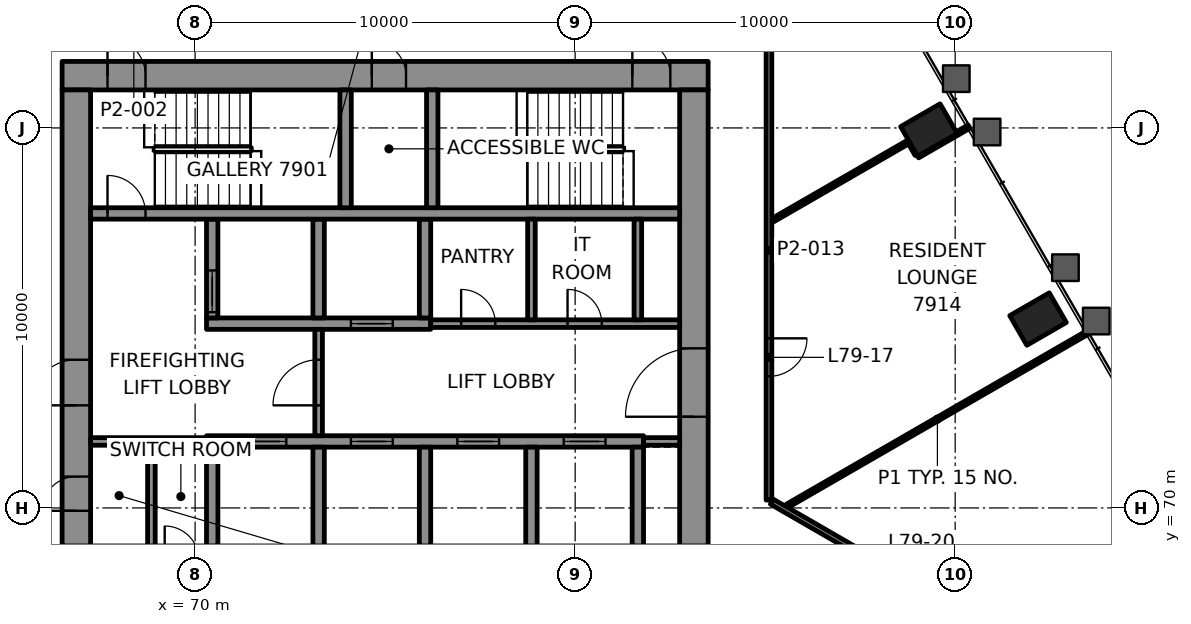
"""IFC4 building model, lengths in metres.
Left out: names, types, materials, properties, quantities, classifications, styles, units other than length and angle.
Written with IfcOpenShell. Run it as: python <this file> out.ifc"""

import sys

from ifc_helpers import new_model, si_unit, direction, frame, frame_2d, origin, origin_2d, place, context, subcontext, project, spatial, rectangle, hollow_rectangle, extrude, element, fill, save


model = new_model("IFC4")
c1 = context("Model", 3, precision=1e-05, world=origin(), true_north=direction((0.0, 1.0)))
c2 = subcontext(c1, "Body", "Model", "MODEL_VIEW")
j1 = project(units=[si_unit("LENGTHUNIT", "METRE"), si_unit("PLANEANGLEUNIT", "RADIAN")], contexts=[c1])
p1 = place(None, origin())
s1 = spatial("IfcSite", under=j1, at=p1, CompositionType="ELEMENT")
p2 = place(p1, origin())
s2 = spatial("IfcBuilding", under=s1, at=p2, CompositionType="ELEMENT")
p3 = place(p2, frame((0.0, 0.0, 323.1)))
s3 = spatial("IfcBuildingStorey", under=s2, at=p3, CompositionType="ELEMENT", Elevation=323.1)
for number, where, z_axis, x_axis in (
    (1, (92.181, 74.97, -0.0), (0.0, 0.0, 1.0), (-0.5, 0.866, 0.0)),
    (2, (89.309, 79.945, -0.0), (0.0, 0.0, 1.0), (-0.5, 0.866, 0.0)),
):
    element("IfcColumn", number, at=place(p3, frame(where, z_axis=z_axis, x_axis=x_axis)), inside=s3, PredefinedType="COLUMN", context=c2, shape_type="SweptSolid", body=[
        extrude(hollow_rectangle(XDim=0.9, YDim=1.2, WallThickness=0.06, at=origin_2d()), origin(), (0.0, 0.0, 1.0), 3.5),
    ])
p4 = place(p3, frame((66.5, 81.375, 0.0), z_axis=(0.0, 0.0, 1.0), x_axis=(1.0, 0.0, 0.0)))
e3 = element("IfcWall", 3, at=p4, inside=s3, PredefinedType="SHEAR", context=c2, shape_type="SweptSolid", body=[
    extrude(rectangle(XDim=17.0, YDim=0.75, at=frame_2d((8.5, 0.0))), origin(), (0.0, 0.0, 1.0), 3.2),
])
p5 = place(p4, frame((1.195, 0.0, 0.0)))
e4 = element("IfcOpeningElement", 4, at=p5, cuts=e3, PredefinedType="OPENING", context=c2, shape_type="SweptSolid", body=[
    extrude(rectangle(XDim=1.0, YDim=2.1, at=frame_2d((0.5, 1.05))), frame((0.0, 0.385, 0.0), z_axis=(0.0, -1.0, 0.0), x_axis=(1.0, 0.0, 0.0)), (0.0, 0.0, 1.0), 0.77),
])
p6 = place(p4, frame((15.005, 0.0, 0.0)))
e5 = element("IfcOpeningElement", 5, at=p6, cuts=e3, PredefinedType="OPENING", context=c2, shape_type="SweptSolid", body=[
    extrude(rectangle(XDim=1.0, YDim=2.1, at=frame_2d((0.5, 1.05))), frame((0.0, 0.385, 0.0), z_axis=(0.0, -1.0, 0.0), x_axis=(1.0, 0.0, 0.0)), (0.0, 0.0, 1.0), 0.77),
])
p7 = place(p4, frame((8.15, 0.0, 0.0)))
e6 = element("IfcOpeningElement", 6, at=p7, cuts=e3, PredefinedType="OPENING", context=c2, shape_type="SweptSolid", body=[
    extrude(rectangle(XDim=0.9, YDim=2.1, at=frame_2d((0.45, 1.05))), frame((0.0, 0.385, 0.0), z_axis=(0.0, -1.0, 0.0), x_axis=(1.0, 0.0, 0.0)), (0.0, 0.0, 1.0), 0.77),
])
p8 = place(p3, frame((66.875, 69.0, 0.0), z_axis=(0.0, 0.0, 1.0), x_axis=(0.0, 1.0, 0.0)))
e7 = element("IfcWall", 7, at=p8, inside=s3, PredefinedType="SHEAR", context=c2, shape_type="SweptSolid", body=[
    extrude(rectangle(XDim=12.0, YDim=0.75, at=frame_2d((6.0, 0.0))), origin(), (0.0, 0.0, 1.0), 3.2),
])
p9 = place(p8, frame((3.7, 0.0, 0.0)))
e8 = element("IfcOpeningElement", 8, at=p9, cuts=e7, PredefinedType="OPENING", context=c2, shape_type="SweptSolid", body=[
    extrude(rectangle(XDim=1.2, YDim=2.1, at=frame_2d((0.6, 1.05))), frame((0.0, 0.385, 0.0), z_axis=(0.0, -1.0, 0.0), x_axis=(1.0, 0.0, 0.0)), (0.0, 0.0, 1.0), 0.77),
])
p10 = place(p8, frame((0.925, 0.0, 0.0)))
e9 = element("IfcOpeningElement", 9, at=p10, cuts=e7, PredefinedType="OPENING", context=c2, shape_type="SweptSolid", body=[
    extrude(rectangle(XDim=0.9, YDim=2.1, at=frame_2d((0.45, 1.05))), frame((0.0, 0.385, 0.0), z_axis=(0.0, -1.0, 0.0), x_axis=(1.0, 0.0, 0.0)), (0.0, 0.0, 1.0), 0.77),
])
p11 = place(p3, frame((83.125, 69.0, 0.0), z_axis=(0.0, 0.0, 1.0), x_axis=(0.0, 1.0, 0.0)))
e10 = element("IfcWall", 10, at=p11, inside=s3, PredefinedType="SHEAR", context=c2, shape_type="SweptSolid", body=[
    extrude(rectangle(XDim=12.0, YDim=0.75, at=frame_2d((6.0, 0.0))), origin(), (0.0, 0.0, 1.0), 3.2),
])
p12 = place(p11, frame((3.4, 0.0, 0.0)))
e11 = element("IfcOpeningElement", 11, at=p12, cuts=e10, PredefinedType="OPENING", context=c2, shape_type="SweptSolid", body=[
    extrude(rectangle(XDim=1.8, YDim=2.1, at=frame_2d((0.9, 1.05))), frame((0.0, 0.385, 0.0), z_axis=(0.0, -1.0, 0.0), x_axis=(1.0, 0.0, 0.0)), (0.0, 0.0, 1.0), 0.77),
])
p13 = place(p3, frame((70.3, 71.75, 0.0), z_axis=(0.0, 0.0, 1.0), x_axis=(1.0, 0.0, 0.0)))
e12 = element("IfcWall", 12, at=p13, inside=s3, PredefinedType="SHEAR", context=c2, shape_type="SweptSolid", body=[
    extrude(rectangle(XDim=11.5, YDim=0.3, at=frame_2d((5.75, 0.0))), origin(), (0.0, 0.0, 1.0), 3.2),
])
p14 = place(p13, frame((1.0, 0.0, 0.0)))
e13 = element("IfcOpeningElement", 13, at=p14, cuts=e12, PredefinedType="OPENING", context=c2, shape_type="SweptSolid", body=[
    extrude(rectangle(XDim=1.1, YDim=2.1, at=frame_2d((0.55, 1.05))), frame((0.0, 0.16, 0.0), z_axis=(0.0, -1.0, 0.0), x_axis=(1.0, 0.0, 0.0)), (0.0, 0.0, 1.0), 0.32),
])
p15 = place(p13, frame((3.8, 0.0, 0.0)))
e14 = element("IfcOpeningElement", 14, at=p15, cuts=e12, PredefinedType="OPENING", context=c2, shape_type="SweptSolid", body=[
    extrude(rectangle(XDim=1.1, YDim=2.1, at=frame_2d((0.55, 1.05))), frame((0.0, 0.16, 0.0), z_axis=(0.0, -1.0, 0.0), x_axis=(1.0, 0.0, 0.0)), (0.0, 0.0, 1.0), 0.32),
])
p16 = place(p13, frame((6.6, 0.0, 0.0)))
e15 = element("IfcOpeningElement", 15, at=p16, cuts=e12, PredefinedType="OPENING", context=c2, shape_type="SweptSolid", body=[
    extrude(rectangle(XDim=1.1, YDim=2.1, at=frame_2d((0.55, 1.05))), frame((0.0, 0.16, 0.0), z_axis=(0.0, -1.0, 0.0), x_axis=(1.0, 0.0, 0.0)), (0.0, 0.0, 1.0), 0.32),
])
p17 = place(p13, frame((9.4, 0.0, 0.0)))
e16 = element("IfcOpeningElement", 16, at=p17, cuts=e12, PredefinedType="OPENING", context=c2, shape_type="SweptSolid", body=[
    extrude(rectangle(XDim=1.1, YDim=2.1, at=frame_2d((0.55, 1.05))), frame((0.0, 0.16, 0.0), z_axis=(0.0, -1.0, 0.0), x_axis=(1.0, 0.0, 0.0)), (0.0, 0.0, 1.0), 0.32),
])
p18 = place(p3, frame((70.3, 74.85, 0.0), z_axis=(0.0, 0.0, 1.0), x_axis=(1.0, 0.0, 0.0)))
e17 = element("IfcWall", 17, at=p18, inside=s3, PredefinedType="SHEAR", context=c2, shape_type="SweptSolid", body=[
    extrude(rectangle(XDim=5.9, YDim=0.3, at=frame_2d((2.95, 0.0))), origin(), (0.0, 0.0, 1.0), 3.2),
])
p19 = place(p18, frame((3.8, 0.0, 0.0)))
e18 = element("IfcOpeningElement", 18, at=p19, cuts=e17, PredefinedType="OPENING", context=c2, shape_type="SweptSolid", body=[
    extrude(rectangle(XDim=1.1, YDim=2.1, at=frame_2d((0.55, 1.05))), frame((0.0, 0.16, 0.0), z_axis=(0.0, -1.0, 0.0), x_axis=(1.0, 0.0, 0.0)), (0.0, 0.0, 1.0), 0.32),
])
p20 = place(p3, frame((70.45, 69.0, 0.0), z_axis=(0.0, 0.0, 1.0), x_axis=(0.0, 1.0, 0.0)))
e19 = element("IfcWall", 19, at=p20, inside=s3, PredefinedType="SHEAR", context=c2, shape_type="SweptSolid", body=[
    extrude(rectangle(XDim=2.6, YDim=0.3, at=frame_2d((1.3, 0.0))), origin(), (0.0, 0.0, 1.0), 3.2),
])
p21 = place(p3, frame((70.45, 75.0, 0.0), z_axis=(0.0, 0.0, 1.0), x_axis=(0.0, 1.0, 0.0)))
e20 = element("IfcWall", 20, at=p21, inside=s3, PredefinedType="SHEAR", context=c2, shape_type="SweptSolid", body=[
    extrude(rectangle(XDim=2.6, YDim=0.3, at=frame_2d((1.3, 0.0))), origin(), (0.0, 0.0, 1.0), 3.2),
])
p22 = place(p21, frame((0.15, 0.0, 0.0)))
e21 = element("IfcOpeningElement", 21, at=p22, cuts=e20, PredefinedType="OPENING", context=c2, shape_type="SweptSolid", body=[
    extrude(rectangle(XDim=1.1, YDim=2.1, at=frame_2d((0.55, 1.05))), frame((0.0, 0.16, 0.0), z_axis=(0.0, -1.0, 0.0), x_axis=(1.0, 0.0, 0.0)), (0.0, 0.0, 1.0), 0.32),
])
for number, where, z_axis, x_axis in (
    (22, (73.25, 69.0, 0.0), (0.0, 0.0, 1.0), (0.0, 1.0, 0.0)),
    (23, (73.25, 75.0, 0.0), (0.0, 0.0, 1.0), (0.0, 1.0, 0.0)),
    (24, (76.05, 69.0, 0.0), (0.0, 0.0, 1.0), (0.0, 1.0, 0.0)),
    (25, (76.05, 75.0, 0.0), (0.0, 0.0, 1.0), (0.0, 1.0, 0.0)),
    (26, (78.85, 69.0, 0.0), (0.0, 0.0, 1.0), (0.0, 1.0, 0.0)),
    (27, (81.65, 69.0, 0.0), (0.0, 0.0, 1.0), (0.0, 1.0, 0.0)),
):
    element("IfcWall", number, at=place(p3, frame(where, z_axis=z_axis, x_axis=x_axis)), inside=s3, PredefinedType="SHEAR", context=c2, shape_type="SweptSolid", body=[
        extrude(rectangle(XDim=2.6, YDim=0.3, at=frame_2d((1.3, 0.0))), origin(), (0.0, 0.0, 1.0), 3.2),
    ])
p23 = place(p3, frame((67.25, 77.75, 0.0), z_axis=(0.0, 0.0, 1.0), x_axis=(1.0, 0.0, 0.0)))
e28 = element("IfcWall", 28, at=p23, inside=s3, PredefinedType="SHEAR", context=c2, shape_type="SweptSolid", body=[
    extrude(rectangle(XDim=15.5, YDim=0.3, at=frame_2d((7.75, 0.0))), origin(), (0.0, 0.0, 1.0), 3.2),
])
p24 = place(p23, frame((0.445, 0.0, 0.0)))
e29 = element("IfcOpeningElement", 29, at=p24, cuts=e28, PredefinedType="OPENING", context=c2, shape_type="SweptSolid", body=[
    extrude(rectangle(XDim=1.0, YDim=2.1, at=frame_2d((0.5, 1.05))), frame((0.0, 0.16, 0.0), z_axis=(0.0, -1.0, 0.0), x_axis=(1.0, 0.0, 0.0)), (0.0, 0.0, 1.0), 0.32),
])
for number, where, z_axis, x_axis in (
    (30, (73.96, 77.9, 0.0), (0.0, 0.0, 1.0), (0.0, 1.0, 0.0)),
    (31, (76.24, 77.9, 0.0), (0.0, 0.0, 1.0), (0.0, 1.0, 0.0)),
):
    element("IfcWall", number, at=place(p3, frame(where, z_axis=z_axis, x_axis=x_axis)), inside=s3, PredefinedType="SHEAR", context=c2, shape_type="SweptSolid", body=[
        extrude(rectangle(XDim=3.1, YDim=0.3, at=frame_2d((1.55, 0.0))), origin(), (0.0, 0.0, 1.0), 3.2),
    ])
p25 = place(p3, frame((85.574, 70.051, 0.0), z_axis=(0.0, 0.0, 1.0), x_axis=(0.866020575072, 0.500008363482, 0.0)))
e32 = element("IfcWall", 32, at=p25, inside=s3, PredefinedType="PARTITIONING", context=c2, shape_type="SweptSolid", body=[
    extrude(rectangle(XDim=9.141, YDim=0.1, at=frame_2d((4.57, 0.0))), origin(), (0.0, 0.0, 1.0), 2.588),
])
p26 = place(p3, frame((89.014, 79.255, 0.0), z_axis=(0.0, 0.0, 1.0), x_axis=(0.866018739521, 0.500011542666, 0.0)))
e33 = element("IfcWall", 33, at=p26, inside=s3, PredefinedType="PARTITIONING", context=c2, shape_type="SweptSolid", body=[
    extrude(rectangle(XDim=1.56, YDim=0.1, at=frame_2d((0.78, 0.0))), origin(), (0.0, 0.0, 1.0), 2.588),
])
p27 = place(p3, frame((85.201, 77.573, 0.0), z_axis=(0.0, 0.0, 1.0), x_axis=(0.866029543084, 0.499992830454, 0.0)))
e34 = element("IfcWall", 34, at=p27, inside=s3, PredefinedType="PARTITIONING", context=c2, shape_type="SweptSolid", body=[
    extrude(rectangle(XDim=4.143, YDim=0.1, at=frame_2d((2.071, 0.0))), origin(), (0.0, 0.0, 1.0), 2.6),
])
p28 = place(p3, frame((85.1, 83.349, 0.0), z_axis=(0.0, 0.0, 1.0), x_axis=(0.0, -1.0, 0.0)))
e35 = element("IfcWall", 35, at=p28, inside=s3, PredefinedType="PARTITIONING", context=c2, shape_type="SweptSolid", body=[
    extrude(rectangle(XDim=13.141, YDim=0.15, at=frame_2d((6.571, 0.0))), origin(), (0.0, 0.0, 1.0), 2.6),
])
p29 = place(p28, frame((8.886, 0.0, 0.0)))
e36 = element("IfcOpeningElement", 36, at=p29, cuts=e35, PredefinedType="OPENING", context=c2, shape_type="SweptSolid", body=[
    extrude(rectangle(XDim=1.0, YDim=2.1, at=frame_2d((0.5, 1.05))), frame((0.0, 0.085, 0.0), z_axis=(0.0, -1.0, 0.0), x_axis=(1.0, 0.0, 0.0)), (0.0, 0.0, 1.0), 0.17),
])
p30 = place(p3, frame((88.989, 79.299, 0.0), z_axis=(0.0, 0.0, 1.0), x_axis=(-0.500126092966, 0.865952591736, 0.0)))
e37 = element("IfcWall", 37, at=p30, inside=s3, PredefinedType="PARTITIONING", context=c2, shape_type="SweptSolid", body=[
    extrude(rectangle(XDim=0.349, YDim=0.1, at=frame_2d((0.175, 0.0))), origin(), (0.0, 0.0, 1.0), 2.6),
])
p31 = place(p3, frame((85.175, 70.165, 0.0), z_axis=(0.0, 0.0, 1.0), x_axis=(0.866024989193, -0.500000718093, 0.0)))
e38 = element("IfcWall", 38, at=p31, inside=s3, PredefinedType="PARTITIONING", context=c2, shape_type="SweptSolid", body=[
    extrude(rectangle(XDim=11.063, YDim=0.15, at=frame_2d((5.531, 0.0))), origin(), (0.0, 0.0, 1.0), 2.6),
])
p32 = place(p31, frame((5.102, 0.0, 0.0)))
e39 = element("IfcOpeningElement", 39, at=p32, cuts=e38, PredefinedType="OPENING", context=c2, shape_type="SweptSolid", body=[
    extrude(rectangle(XDim=1.0, YDim=2.1, at=frame_2d((0.5, 1.05))), frame((0.0, 0.085, 0.0), z_axis=(0.0, -1.0, 0.0), x_axis=(1.0, 0.0, 0.0)), (0.0, 0.0, 1.0), 0.17),
])
p33 = place(p3, frame((69.117, 103.238, 0.0), z_axis=(0.0, 0.0, 1.0), x_axis=(-0.500001437611, -0.866024573778, 0.0)))
e40 = element("IfcWall", 40, at=p33, inside=s3, PredefinedType="SOLIDWALL", context=c2, shape_type="SweptSolid", body=[
    extrude(rectangle(XDim=43.027, YDim=0.8, at=frame_2d((21.513, 0.0))), origin(), (0.0, 0.0, 1.0), 0.9),
])
p34 = place(p3, frame((67.25, 71.75, 0.0), z_axis=(0.0, 0.0, 1.0), x_axis=(1.0, 0.0, 0.0)))
e41 = element("IfcWall", 41, at=p34, inside=s3, PredefinedType="PARTITIONING", context=c2, shape_type="SweptSolid", body=[
    extrude(rectangle(XDim=3.05, YDim=0.2, at=frame_2d((1.525, 0.0))), origin(), (0.0, 0.0, 1.0), 3.2),
])
p35 = place(p3, frame((81.8, 71.75, 0.0), z_axis=(0.0, 0.0, 1.0), x_axis=(1.0, 0.0, 0.0)))
e42 = element("IfcWall", 42, at=p35, inside=s3, PredefinedType="PARTITIONING", context=c2, shape_type="SweptSolid", body=[
    extrude(rectangle(XDim=0.95, YDim=0.2, at=frame_2d((0.475, 0.0))), origin(), (0.0, 0.0, 1.0), 3.2),
])
p36 = place(p3, frame((76.2, 74.85, 0.0), z_axis=(0.0, 0.0, 1.0), x_axis=(1.0, 0.0, 0.0)))
e43 = element("IfcWall", 43, at=p36, inside=s3, PredefinedType="PARTITIONING", context=c2, shape_type="SweptSolid", body=[
    extrude(rectangle(XDim=6.55, YDim=0.2, at=frame_2d((3.275, 0.0))), origin(), (0.0, 0.0, 1.0), 3.2),
])
p37 = place(p36, frame((0.8, 0.0, 0.0)))
e44 = element("IfcOpeningElement", 44, at=p37, cuts=e43, PredefinedType="OPENING", context=c2, shape_type="SweptSolid", body=[
    extrude(rectangle(XDim=0.9, YDim=2.1, at=frame_2d((0.45, 1.05))), frame((0.0, 0.11, 0.0), z_axis=(0.0, -1.0, 0.0), x_axis=(1.0, 0.0, 0.0)), (0.0, 0.0, 1.0), 0.22),
])
p38 = place(p36, frame((3.6, 0.0, 0.0)))
e45 = element("IfcOpeningElement", 45, at=p38, cuts=e43, PredefinedType="OPENING", context=c2, shape_type="SweptSolid", body=[
    extrude(rectangle(XDim=0.9, YDim=2.1, at=frame_2d((0.45, 1.05))), frame((0.0, 0.11, 0.0), z_axis=(0.0, -1.0, 0.0), x_axis=(1.0, 0.0, 0.0)), (0.0, 0.0, 1.0), 0.22),
])
p39 = place(p3, frame((68.85, 69.0, 0.0), z_axis=(0.0, 0.0, 1.0), x_axis=(0.0, 1.0, 0.0)))
e46 = element("IfcWall", 46, at=p39, inside=s3, PredefinedType="PARTITIONING", context=c2, shape_type="SweptSolid", body=[
    extrude(rectangle(XDim=2.65, YDim=0.2, at=frame_2d((1.325, 0.0))), origin(), (0.0, 0.0, 1.0), 3.2),
])
p40 = place(p3, frame((73.25, 71.9, 0.0), z_axis=(0.0, 0.0, 1.0), x_axis=(0.0, 1.0, 0.0)))
e47 = element("IfcWall", 47, at=p40, inside=s3, PredefinedType="PARTITIONING", context=c2, shape_type="SweptSolid", body=[
    extrude(rectangle(XDim=2.8, YDim=0.2, at=frame_2d((1.4, 0.0))), origin(), (0.0, 0.0, 1.0), 3.2),
])
p41 = place(p40, frame((0.8, 0.0, 0.0)))
e48 = element("IfcOpeningElement", 48, at=p41, cuts=e47, PredefinedType="OPENING", context=c2, shape_type="SweptSolid", body=[
    extrude(rectangle(XDim=1.2, YDim=2.1, at=frame_2d((0.6, 1.05))), frame((0.0, 0.11, 0.0), z_axis=(0.0, -1.0, 0.0), x_axis=(1.0, 0.0, 0.0)), (0.0, 0.0, 1.0), 0.22),
])
for number, where, z_axis, x_axis in (
    (49, (78.85, 74.95, 0.0), (0.0, 0.0, 1.0), (0.0, 1.0, 0.0)),
    (50, (81.65, 74.95, 0.0), (0.0, 0.0, 1.0), (0.0, 1.0, 0.0)),
):
    element("IfcWall", number, at=place(p3, frame(where, z_axis=z_axis, x_axis=x_axis)), inside=s3, PredefinedType="PARTITIONING", context=c2, shape_type="SweptSolid", body=[
        extrude(rectangle(XDim=2.65, YDim=0.2, at=frame_2d((1.325, 0.0))), origin(), (0.0, 0.0, 1.0), 3.2),
    ])
p42 = place(p29, origin())
e51 = element("IfcDoor", 51, at=p42, inside=s3, OperationType="SINGLE_SWING_RIGHT", PredefinedType="DOOR", context=c2, shape_type="SweptSolid", body=[
    extrude(rectangle(XDim=1.0, YDim=2.1, at=frame_2d((0.5, 1.05))), frame((0.0, 0.025, 0.0), z_axis=(0.0, -1.0, 0.0), x_axis=(1.0, 0.0, 0.0)), (0.0, 0.0, 1.0), 0.05),
])
fill(e36, e51)
p43 = place(p14, origin())
e52 = element("IfcDoor", 52, at=p43, inside=s3, OperationType="DOUBLE_DOOR_SLIDING", PredefinedType="DOOR", context=c2, shape_type="SweptSolid", body=[
    extrude(rectangle(XDim=1.1, YDim=2.1, at=frame_2d((0.55, 1.05))), frame((0.0, 0.025, 0.0), z_axis=(0.0, -1.0, 0.0), x_axis=(1.0, 0.0, 0.0)), (0.0, 0.0, 1.0), 0.05),
])
fill(e13, e52)
p44 = place(p15, origin())
e53 = element("IfcDoor", 53, at=p44, inside=s3, OperationType="DOUBLE_DOOR_SLIDING", PredefinedType="DOOR", context=c2, shape_type="SweptSolid", body=[
    extrude(rectangle(XDim=1.1, YDim=2.1, at=frame_2d((0.55, 1.05))), frame((0.0, 0.025, 0.0), z_axis=(0.0, -1.0, 0.0), x_axis=(1.0, 0.0, 0.0)), (0.0, 0.0, 1.0), 0.05),
])
fill(e14, e53)
p45 = place(p16, origin())
e54 = element("IfcDoor", 54, at=p45, inside=s3, OperationType="DOUBLE_DOOR_SLIDING", PredefinedType="DOOR", context=c2, shape_type="SweptSolid", body=[
    extrude(rectangle(XDim=1.1, YDim=2.1, at=frame_2d((0.55, 1.05))), frame((0.0, 0.025, 0.0), z_axis=(0.0, -1.0, 0.0), x_axis=(1.0, 0.0, 0.0)), (0.0, 0.0, 1.0), 0.05),
])
fill(e15, e54)
p46 = place(p17, origin())
e55 = element("IfcDoor", 55, at=p46, inside=s3, OperationType="DOUBLE_DOOR_SLIDING", PredefinedType="DOOR", context=c2, shape_type="SweptSolid", body=[
    extrude(rectangle(XDim=1.1, YDim=2.1, at=frame_2d((0.55, 1.05))), frame((0.0, 0.025, 0.0), z_axis=(0.0, -1.0, 0.0), x_axis=(1.0, 0.0, 0.0)), (0.0, 0.0, 1.0), 0.05),
])
fill(e16, e55)
p47 = place(p22, origin())
e56 = element("IfcDoor", 56, at=p47, inside=s3, OperationType="DOUBLE_DOOR_SLIDING", PredefinedType="DOOR", context=c2, shape_type="SweptSolid", body=[
    extrude(rectangle(XDim=1.1, YDim=2.1, at=frame_2d((0.55, 1.05))), frame((0.0, 0.025, 0.0), z_axis=(0.0, -1.0, 0.0), x_axis=(1.0, 0.0, 0.0)), (0.0, 0.0, 1.0), 0.05),
])
fill(e21, e56)
p48 = place(p19, origin())
e57 = element("IfcDoor", 57, at=p48, inside=s3, OperationType="DOUBLE_DOOR_SLIDING", PredefinedType="DOOR", context=c2, shape_type="SweptSolid", body=[
    extrude(rectangle(XDim=1.1, YDim=2.1, at=frame_2d((0.55, 1.05))), frame((0.0, 0.025, 0.0), z_axis=(0.0, -1.0, 0.0), x_axis=(1.0, 0.0, 0.0)), (0.0, 0.0, 1.0), 0.05),
])
fill(e18, e57)
p49 = place(p24, origin())
e58 = element("IfcDoor", 58, at=p49, inside=s3, OperationType="SINGLE_SWING_LEFT", PredefinedType="DOOR", context=c2, shape_type="SweptSolid", body=[
    extrude(rectangle(XDim=1.0, YDim=2.1, at=frame_2d((0.5, 1.05))), frame((0.0, 0.025, 0.0), z_axis=(0.0, -1.0, 0.0), x_axis=(1.0, 0.0, 0.0)), (0.0, 0.0, 1.0), 0.05),
])
fill(e29, e58)
p50 = place(p5, origin())
e59 = element("IfcDoor", 59, at=p50, inside=s3, OperationType="SINGLE_SWING_RIGHT", PredefinedType="DOOR", context=c2, shape_type="SweptSolid", body=[
    extrude(rectangle(XDim=1.0, YDim=2.1, at=frame_2d((0.5, 1.05))), frame((0.0, 0.095, 0.0), z_axis=(0.0, -1.0, 0.0), x_axis=(1.0, 0.0, 0.0)), (0.0, 0.0, 1.0), 0.19),
])
fill(e4, e59)
p51 = place(p6, origin())
e60 = element("IfcDoor", 60, at=p51, inside=s3, OperationType="SINGLE_SWING_LEFT", PredefinedType="DOOR", context=c2, shape_type="SweptSolid", body=[
    extrude(rectangle(XDim=1.0, YDim=2.1, at=frame_2d((0.5, 1.05))), frame((0.0, 0.095, 0.0), z_axis=(0.0, -1.0, 0.0), x_axis=(1.0, 0.0, 0.0)), (0.0, 0.0, 1.0), 0.19),
])
fill(e5, e60)
p52 = place(p41, origin())
e61 = element("IfcDoor", 61, at=p52, inside=s3, OperationType="SINGLE_SWING_LEFT", PredefinedType="DOOR", context=c2, shape_type="SweptSolid", body=[
    extrude(rectangle(XDim=1.2, YDim=2.1, at=frame_2d((0.6, 1.05))), frame((0.0, 0.025, 0.0), z_axis=(0.0, -1.0, 0.0), x_axis=(1.0, 0.0, 0.0)), (0.0, 0.0, 1.0), 0.05),
])
fill(e48, e61)
p53 = place(p9, origin())
e62 = element("IfcDoor", 62, at=p53, inside=s3, OperationType="SINGLE_SWING_RIGHT", PredefinedType="DOOR", context=c2, shape_type="SweptSolid", body=[
    extrude(rectangle(XDim=1.2, YDim=2.1, at=frame_2d((0.6, 1.05))), frame((0.0, 0.095, 0.0), z_axis=(0.0, -1.0, 0.0), x_axis=(1.0, 0.0, 0.0)), (0.0, 0.0, 1.0), 0.19),
])
fill(e8, e62)
p54 = place(p12, origin())
e63 = element("IfcDoor", 63, at=p54, inside=s3, OperationType="SINGLE_SWING_LEFT", PredefinedType="DOOR", context=c2, shape_type="SweptSolid", body=[
    extrude(rectangle(XDim=1.8, YDim=2.1, at=frame_2d((0.9, 1.05))), frame((0.0, 0.095, 0.0), z_axis=(0.0, -1.0, 0.0), x_axis=(1.0, 0.0, 0.0)), (0.0, 0.0, 1.0), 0.19),
])
fill(e11, e63)
p55 = place(p10, origin())
e64 = element("IfcDoor", 64, at=p55, inside=s3, OperationType="SINGLE_SWING_RIGHT", PredefinedType="DOOR", context=c2, shape_type="SweptSolid", body=[
    extrude(rectangle(XDim=0.9, YDim=2.1, at=frame_2d((0.45, 1.05))), frame((0.0, 0.095, 0.0), z_axis=(0.0, -1.0, 0.0), x_axis=(1.0, 0.0, 0.0)), (0.0, 0.0, 1.0), 0.19),
])
fill(e9, e64)
p56 = place(p37, origin())
e65 = element("IfcDoor", 65, at=p56, inside=s3, OperationType="SINGLE_SWING_RIGHT", PredefinedType="DOOR", context=c2, shape_type="SweptSolid", body=[
    extrude(rectangle(XDim=0.9, YDim=2.1, at=frame_2d((0.45, 1.05))), frame((0.0, 0.025, 0.0), z_axis=(0.0, -1.0, 0.0), x_axis=(1.0, 0.0, 0.0)), (0.0, 0.0, 1.0), 0.05),
])
fill(e44, e65)
p57 = place(p38, origin())
e66 = element("IfcDoor", 66, at=p57, inside=s3, OperationType="SINGLE_SWING_LEFT", PredefinedType="DOOR", context=c2, shape_type="SweptSolid", body=[
    extrude(rectangle(XDim=0.9, YDim=2.1, at=frame_2d((0.45, 1.05))), frame((0.0, 0.025, 0.0), z_axis=(0.0, -1.0, 0.0), x_axis=(1.0, 0.0, 0.0)), (0.0, 0.0, 1.0), 0.05),
])
fill(e45, e66)
p58 = place(p7, origin())
e67 = element("IfcDoor", 67, at=p58, inside=s3, OperationType="SINGLE_SWING_RIGHT", PredefinedType="DOOR", context=c2, shape_type="SweptSolid", body=[
    extrude(rectangle(XDim=0.9, YDim=2.1, at=frame_2d((0.45, 1.05))), frame((0.0, 0.095, 0.0), z_axis=(0.0, -1.0, 0.0), x_axis=(1.0, 0.0, 0.0)), (0.0, 0.0, 1.0), 0.19),
])
fill(e6, e67)
save(model, sys.argv[1])
